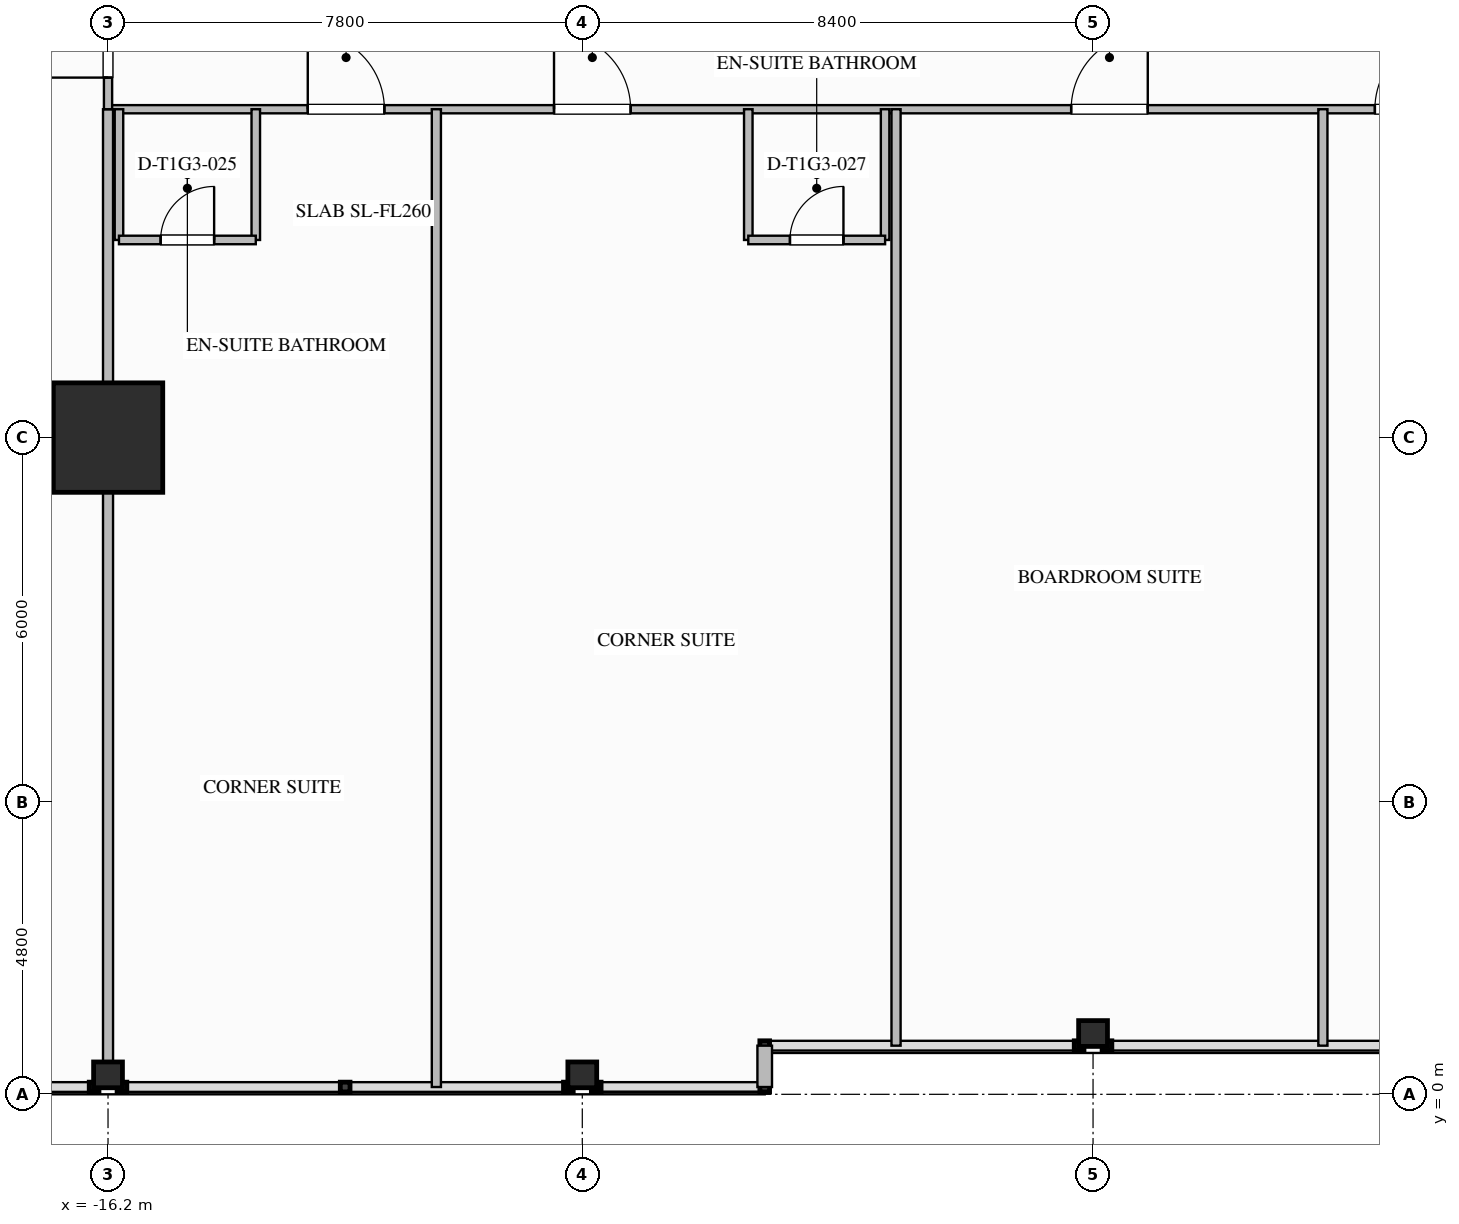
"""IFC4 building model, lengths in metres.
Left out: names, types, materials, properties, quantities, classifications, styles, units other than length and angle.
Written with IfcOpenShell. Run it as: python <this file> out.ifc"""

import sys

from ifc_helpers import new_model, si_unit, direction, frame, frame_2d, origin, origin_2d, place, context, subcontext, project, spatial, rectangle, i_section, extrude, element, fill, save


model = new_model("IFC4")
c1 = context("Model", 3, precision=1e-05, world=origin(), true_north=direction((0.0, 1.0)))
c2 = subcontext(c1, "Body", "Model", "MODEL_VIEW")
j1 = project(units=[si_unit("LENGTHUNIT", "METRE"), si_unit("PLANEANGLEUNIT", "RADIAN")], contexts=[c1])
p1 = place(None, origin())
s1 = spatial("IfcSite", under=j1, at=p1, CompositionType="ELEMENT")
p2 = place(p1, origin())
s2 = spatial("IfcBuilding", under=s1, at=p2, CompositionType="ELEMENT")
p3 = place(p2, frame((0.0, 0.0, 61.2)))
s3 = spatial("IfcBuildingStorey", under=s2, at=p3, CompositionType="ELEMENT", Elevation=61.2)
p4 = place(p3, frame((-16.2, 10.8, 0.0), z_axis=(0.0, 0.0, 1.0), x_axis=(1.0, 0.0, 0.0)))
e1 = element("IfcColumn", 1, at=p4, inside=s3, PredefinedType="COLUMN", context=c2, shape_type="SweptSolid", body=[
    extrude(rectangle(XDim=1.8, YDim=1.8, at=origin_2d()), origin(), (0.0, 0.0, 1.0), 3.5),
])
for number, where, z_axis, x_axis in (
    (2, (-16.2, 0.32, 0.0), (0.0, 0.0, 1.0), (0.0, 1.0, 0.0)),
    (3, (-8.4, 0.32, 0.0), (0.0, 0.0, 1.0), (0.0, 1.0, 0.0)),
    (4, (0.0, 1.0, 0.0), (0.0, 0.0, 1.0), (0.0, 1.0, 0.0)),
):
    element("IfcColumn", number, at=place(p3, frame(where, z_axis=z_axis, x_axis=x_axis)), inside=s3, PredefinedType="COLUMN", context=c2, shape_type="SweptSolid", body=[
        extrude(i_section(OverallWidth=0.424, OverallDepth=0.474, WebThickness=0.048, FlangeThickness=0.077, FilletRadius=0.03, at=origin_2d()), origin(), (0.0, 0.0, 1.0), 3.497),
    ])
p5 = place(p3, frame((-5.4, 0.8, 0.0), z_axis=(0.0, 0.0, 1.0), x_axis=(0.0, -1.0, 0.0)))
e5 = element("IfcWall", 5, at=p5, inside=s3, PredefinedType="STANDARD", context=c2, shape_type="SweptSolid", body=[
    extrude(rectangle(XDim=0.68, YDim=0.24, at=frame_2d((0.34, 0.0))), origin(), (0.0, 0.0, 1.0), 3.24),
])
p6 = place(p3, frame((-16.2, 16.2, 0.0), z_axis=(0.0, 0.0, 1.0), x_axis=(1.0, 0.0, 0.0)))
e6 = element("IfcWall", 6, at=p6, inside=s3, PredefinedType="PARTITIONING", context=c2, shape_type="SweptSolid", body=[
    extrude(rectangle(XDim=32.4, YDim=0.135, at=frame_2d((16.2, 0.0))), origin(), (0.0, 0.0, 1.0), 3.24),
])
p7 = place(p6, frame((3.285, 0.0, 0.0)))
e7 = element("IfcOpeningElement", 7, at=p7, cuts=e6, PredefinedType="OPENING", context=c2, shape_type="SweptSolid", body=[
    extrude(rectangle(XDim=1.26, YDim=2.2, at=frame_2d((0.63, 1.1))), frame((0.0, 0.077, 0.0), z_axis=(0.0, -1.0, 0.0), x_axis=(1.0, 0.0, 0.0)), (0.0, 0.0, 1.0), 0.155),
])
p8 = place(p6, frame((7.335, 0.0, 0.0)))
e8 = element("IfcOpeningElement", 8, at=p8, cuts=e6, PredefinedType="OPENING", context=c2, shape_type="SweptSolid", body=[
    extrude(rectangle(XDim=1.26, YDim=2.2, at=frame_2d((0.63, 1.1))), frame((0.0, 0.077, 0.0), z_axis=(0.0, -1.0, 0.0), x_axis=(1.0, 0.0, 0.0)), (0.0, 0.0, 1.0), 0.155),
])
p9 = place(p6, frame((15.84, 0.0, 0.0)))
e9 = element("IfcOpeningElement", 9, at=p9, cuts=e6, PredefinedType="OPENING", context=c2, shape_type="SweptSolid", body=[
    extrude(rectangle(XDim=1.26, YDim=2.2, at=frame_2d((0.63, 1.1))), frame((0.0, 0.077, 0.0), z_axis=(0.0, -1.0, 0.0), x_axis=(1.0, 0.0, 0.0)), (0.0, 0.0, 1.0), 0.155),
])
p10 = place(p6, frame((20.835, 0.0, 0.0)))
e10 = element("IfcOpeningElement", 10, at=p10, cuts=e6, PredefinedType="OPENING", context=c2, shape_type="SweptSolid", body=[
    extrude(rectangle(XDim=1.26, YDim=2.2, at=frame_2d((0.63, 1.1))), frame((0.0, 0.077, 0.0), z_axis=(0.0, -1.0, 0.0), x_axis=(1.0, 0.0, 0.0)), (0.0, 0.0, 1.0), 0.155),
])
p11 = place(p6, frame((29.475, 0.0, 0.0)))
e11 = element("IfcOpeningElement", 11, at=p11, cuts=e6, PredefinedType="OPENING", context=c2, shape_type="SweptSolid", body=[
    extrude(rectangle(XDim=1.26, YDim=2.2, at=frame_2d((0.63, 1.1))), frame((0.0, 0.077, 0.0), z_axis=(0.0, -1.0, 0.0), x_axis=(1.0, 0.0, 0.0)), (0.0, 0.0, 1.0), 0.155),
])
p12 = place(p3, frame((-16.2, 0.12, 0.0), z_axis=(0.0, 0.0, 1.0), x_axis=(0.0, 1.0, 0.0)))
e12 = element("IfcWall", 12, at=p12, inside=s3, PredefinedType="PARTITIONING", context=c2, shape_type="SweptSolid", body=[
    extrude(rectangle(XDim=16.08, YDim=0.165, at=frame_2d((8.04, 0.0))), origin(), (0.0, 0.0, 1.0), 2.452),
])
p13 = place(p3, frame((-16.2, 16.2, 0.0), z_axis=(0.0, 0.0, 1.0), x_axis=(0.0, 1.0, 0.0)))
e13 = element("IfcWall", 13, at=p13, inside=s3, PredefinedType="PARTITIONING", context=c2, shape_type="SweptSolid", body=[
    extrude(rectangle(XDim=2.1, YDim=0.135, at=frame_2d((1.05, 0.0))), origin(), (0.0, 0.0, 1.0), 2.452),
])
p14 = place(p13, frame((0.52, 0.0, 0.0)))
e14 = element("IfcOpeningElement", 14, at=p14, cuts=e13, PredefinedType="OPENING", context=c2, shape_type="SweptSolid", body=[
    extrude(rectangle(XDim=1.02, YDim=2.15, at=frame_2d((0.51, 1.075))), frame((0.0, 0.077, 0.0), z_axis=(0.0, -1.0, 0.0), x_axis=(1.0, 0.0, 0.0)), (0.0, 0.0, 1.0), 0.155),
])
p15 = place(p3, frame((-16.02, 16.2, 0.0), z_axis=(0.0, 0.0, 1.0), x_axis=(0.0, -1.0, 0.0)))
e15 = element("IfcWall", 15, at=p15, inside=s3, PredefinedType="PLUMBINGWALL", context=c2, shape_type="SweptSolid", body=[
    extrude(rectangle(XDim=2.15, YDim=0.14, at=frame_2d((1.075, 0.0))), origin(), (0.0, 0.0, 1.0), 2.452),
])
p16 = place(p3, frame((-13.77, 16.2, 0.0), z_axis=(0.0, 0.0, 1.0), x_axis=(0.0, -1.0, 0.0)))
e16 = element("IfcWall", 16, at=p16, inside=s3, PredefinedType="PLUMBINGWALL", context=c2, shape_type="SweptSolid", body=[
    extrude(rectangle(XDim=2.15, YDim=0.14, at=frame_2d((1.075, 0.0))), origin(), (0.0, 0.0, 1.0), 3.24),
])
p17 = place(p3, frame((-16.02, 14.05, 0.0), z_axis=(0.0, 0.0, 1.0), x_axis=(1.0, 0.0, 0.0)))
e17 = element("IfcWall", 17, at=p17, inside=s3, PredefinedType="PLUMBINGWALL", context=c2, shape_type="SweptSolid", body=[
    extrude(rectangle(XDim=2.25, YDim=0.14, at=frame_2d((1.125, 0.0))), origin(), (0.0, 0.0, 1.0), 3.24),
])
p18 = place(p17, frame((0.685, 0.0, 0.0)))
e18 = element("IfcOpeningElement", 18, at=p18, cuts=e17, PredefinedType="OPENING", context=c2, shape_type="SweptSolid", body=[
    extrude(rectangle(XDim=0.88, YDim=2.1, at=frame_2d((0.44, 1.05))), frame((0.0, 0.08, 0.0), z_axis=(0.0, -1.0, 0.0), x_axis=(1.0, 0.0, 0.0)), (0.0, 0.0, 1.0), 0.16),
])
p19 = place(p3, frame((-10.8, 0.12, 0.0), z_axis=(0.0, 0.0, 1.0), x_axis=(0.0, 1.0, 0.0)))
e19 = element("IfcWall", 19, at=p19, inside=s3, PredefinedType="PARTITIONING", context=c2, shape_type="SweptSolid", body=[
    extrude(rectangle(XDim=16.08, YDim=0.15, at=frame_2d((8.04, 0.0))), origin(), (0.0, 0.0, 1.0), 3.24),
])
for number, where, z_axis, x_axis in (
    (20, (-5.67, 16.2, 0.0), (0.0, 0.0, 1.0), (0.0, -1.0, 0.0)),
    (21, (-3.42, 16.2, 0.0), (0.0, 0.0, 1.0), (0.0, -1.0, 0.0)),
):
    element("IfcWall", number, at=place(p3, frame(where, z_axis=z_axis, x_axis=x_axis)), inside=s3, PredefinedType="PLUMBINGWALL", context=c2, shape_type="SweptSolid", body=[
        extrude(rectangle(XDim=2.15, YDim=0.14, at=frame_2d((1.075, 0.0))), origin(), (0.0, 0.0, 1.0), 3.24),
    ])
p20 = place(p3, frame((-5.67, 14.05, 0.0), z_axis=(0.0, 0.0, 1.0), x_axis=(1.0, 0.0, 0.0)))
e22 = element("IfcWall", 22, at=p20, inside=s3, PredefinedType="PLUMBINGWALL", context=c2, shape_type="SweptSolid", body=[
    extrude(rectangle(XDim=2.25, YDim=0.14, at=frame_2d((1.125, 0.0))), origin(), (0.0, 0.0, 1.0), 3.24),
])
p21 = place(p20, frame((0.685, 0.0, 0.0)))
e23 = element("IfcOpeningElement", 23, at=p21, cuts=e22, PredefinedType="OPENING", context=c2, shape_type="SweptSolid", body=[
    extrude(rectangle(XDim=0.88, YDim=2.1, at=frame_2d((0.44, 1.05))), frame((0.0, 0.08, 0.0), z_axis=(0.0, -1.0, 0.0), x_axis=(1.0, 0.0, 0.0)), (0.0, 0.0, 1.0), 0.16),
])
for number, where, z_axis, x_axis in (
    (24, (-3.24, 0.8, 0.0), (0.0, 0.0, 1.0), (0.0, 1.0, 0.0)),
    (25, (3.78, 0.8, 0.0), (0.0, 0.0, 1.0), (0.0, 1.0, 0.0)),
):
    element("IfcWall", number, at=place(p3, frame(where, z_axis=z_axis, x_axis=x_axis)), inside=s3, PredefinedType="PARTITIONING", context=c2, shape_type="SweptSolid", body=[
        extrude(rectangle(XDim=15.4, YDim=0.15, at=frame_2d((7.7, 0.0))), origin(), (0.0, 0.0, 1.0), 3.24),
    ])
p22 = place(p14, origin())
e26 = element("IfcDoor", 26, at=p22, inside=s3, OperationType="SINGLE_SWING_LEFT", PredefinedType="DOOR", context=c2, shape_type="SweptSolid", body=[
    extrude(rectangle(XDim=1.02, YDim=2.15, at=frame_2d((0.51, 1.075))), frame((0.0, 0.025, 0.0), z_axis=(0.0, -1.0, 0.0), x_axis=(1.0, 0.0, 0.0)), (0.0, 0.0, 1.0), 0.05),
])
fill(e14, e26)
p23 = place(p18, origin())
e27 = element("IfcDoor", 27, at=p23, inside=s3, OperationType="SINGLE_SWING_RIGHT", PredefinedType="DOOR", context=c2, shape_type="SweptSolid", body=[
    extrude(rectangle(XDim=0.88, YDim=2.1, at=frame_2d((0.44, 1.05))), frame((0.0, 0.025, 0.0), z_axis=(0.0, -1.0, 0.0), x_axis=(1.0, 0.0, 0.0)), (0.0, 0.0, 1.0), 0.05),
])
fill(e18, e27)
p24 = place(p7, origin())
e28 = element("IfcDoor", 28, at=p24, inside=s3, OperationType="SINGLE_SWING_LEFT", PredefinedType="DOOR", context=c2, shape_type="SweptSolid", body=[
    extrude(rectangle(XDim=1.26, YDim=2.2, at=frame_2d((0.63, 1.1))), frame((0.0, 0.025, 0.0), z_axis=(0.0, -1.0, 0.0), x_axis=(1.0, 0.0, 0.0)), (0.0, 0.0, 1.0), 0.05),
])
fill(e7, e28)
p25 = place(p21, origin())
e29 = element("IfcDoor", 29, at=p25, inside=s3, OperationType="SINGLE_SWING_RIGHT", PredefinedType="DOOR", context=c2, shape_type="SweptSolid", body=[
    extrude(rectangle(XDim=0.88, YDim=2.1, at=frame_2d((0.44, 1.05))), frame((0.0, 0.025, 0.0), z_axis=(0.0, -1.0, 0.0), x_axis=(1.0, 0.0, 0.0)), (0.0, 0.0, 1.0), 0.05),
])
fill(e23, e29)
p26 = place(p8, origin())
e30 = element("IfcDoor", 30, at=p26, inside=s3, OperationType="SINGLE_SWING_LEFT", PredefinedType="DOOR", context=c2, shape_type="SweptSolid", body=[
    extrude(rectangle(XDim=1.26, YDim=2.2, at=frame_2d((0.63, 1.1))), frame((0.0, 0.025, 0.0), z_axis=(0.0, -1.0, 0.0), x_axis=(1.0, 0.0, 0.0)), (0.0, 0.0, 1.0), 0.05),
])
fill(e8, e30)
p27 = place(p9, origin())
e31 = element("IfcDoor", 31, at=p27, inside=s3, OperationType="SINGLE_SWING_RIGHT", PredefinedType="DOOR", context=c2, shape_type="SweptSolid", body=[
    extrude(rectangle(XDim=1.26, YDim=2.2, at=frame_2d((0.63, 1.1))), frame((0.0, 0.025, 0.0), z_axis=(0.0, -1.0, 0.0), x_axis=(1.0, 0.0, 0.0)), (0.0, 0.0, 1.0), 0.05),
])
fill(e9, e31)
p28 = place(p10, origin())
e32 = element("IfcDoor", 32, at=p28, inside=s3, OperationType="SINGLE_SWING_RIGHT", PredefinedType="DOOR", context=c2, shape_type="SweptSolid", body=[
    extrude(rectangle(XDim=1.26, YDim=2.2, at=frame_2d((0.63, 1.1))), frame((0.0, 0.025, 0.0), z_axis=(0.0, -1.0, 0.0), x_axis=(1.0, 0.0, 0.0)), (0.0, 0.0, 1.0), 0.05),
])
fill(e10, e32)
save(model, sys.argv[1])
